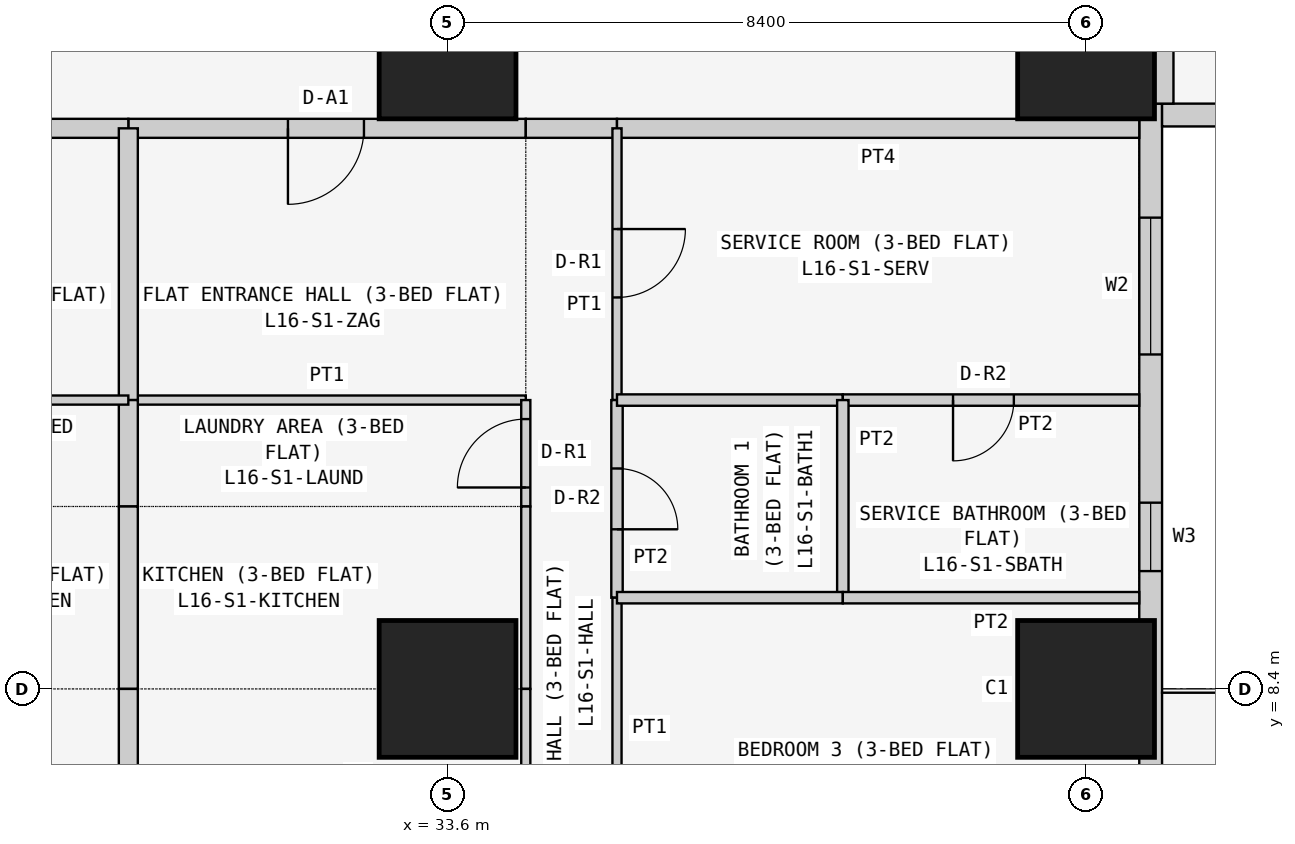
"""IFC4 building model, lengths in metres.
Left out: names, types, materials, properties, quantities, classifications, styles, units other than length and angle.
Written with IfcOpenShell. Run it as: python <this file> out.ifc"""

import sys

from ifc_helpers import new_model, si_unit, direction, frame, frame_2d, origin, origin_2d, place, context, subcontext, project, spatial, rectangle, extrude, element, fill, save


model = new_model("IFC4")
c1 = context("Model", 3, precision=1e-05, world=origin(), true_north=direction((0.0, 1.0)))
c2 = subcontext(c1, "Body", "Model", "MODEL_VIEW")
j1 = project(units=[si_unit("LENGTHUNIT", "METRE"), si_unit("PLANEANGLEUNIT", "RADIAN")], contexts=[c1])
p1 = place(None, origin())
s1 = spatial("IfcSite", under=j1, at=p1, CompositionType="ELEMENT")
p2 = place(p1, origin())
s2 = spatial("IfcBuilding", under=s1, at=p2, CompositionType="ELEMENT")
p3 = place(p2, frame((0.0, 0.0, 66.9)))
s3 = spatial("IfcBuildingStorey", under=s2, at=p3, CompositionType="ELEMENT", Elevation=66.9)
for number, where, z_axis, x_axis in (
    (1, (33.6, 8.4, 0.0), (0.0, 0.0, 1.0), (1.0, 0.0, 0.0)),
    (2, (33.6, 16.8, 0.0), (0.0, 0.0, 1.0), (1.0, 0.0, 0.0)),
    (3, (42.0, 8.4, 0.0), (0.0, 0.0, 1.0), (1.0, 0.0, 0.0)),
    (4, (42.0, 16.8, 0.0), (0.0, 0.0, 1.0), (1.0, 0.0, 0.0)),
):
    element("IfcColumn", number, at=place(p3, frame(where, z_axis=z_axis, x_axis=x_axis)), inside=s3, PredefinedType="COLUMN", context=c2, shape_type="SweptSolid", body=[
        extrude(rectangle(XDim=1.8, YDim=1.8, at=origin_2d()), origin(), (0.0, 0.0, 1.0), 3.6),
    ])
p4 = place(p3, frame((42.85, 0.4, 0.0), z_axis=(0.0, 0.0, 1.0), x_axis=(0.0, 1.0, 0.0)))
e5 = element("IfcWall", 5, at=p4, inside=s3, PredefinedType="SOLIDWALL", context=c2, shape_type="SweptSolid", body=[
    extrude(rectangle(XDim=15.7, YDim=0.3, at=frame_2d((7.85, 0.0))), origin(), (0.0, 0.0, 1.0), 3.45),
])
p5 = place(p4, frame((12.4, 0.0, 0.9)))
e6 = element("IfcOpeningElement", 6, at=p5, cuts=e5, PredefinedType="OPENING", context=c2, shape_type="SweptSolid", body=[
    extrude(rectangle(XDim=1.8, YDim=1.5, at=frame_2d((0.9, 0.75))), frame((0.0, 0.16, 0.0), z_axis=(0.0, -1.0, 0.0), x_axis=(1.0, 0.0, 0.0)), (0.0, 0.0, 1.0), 0.32),
])
p6 = place(p4, frame((9.55, 0.0, 1.5)))
e7 = element("IfcOpeningElement", 7, at=p6, cuts=e5, PredefinedType="OPENING", context=c2, shape_type="SweptSolid", body=[
    extrude(rectangle(XDim=0.9, YDim=0.7, at=frame_2d((0.45, 0.35))), frame((0.0, 0.16, 0.0), z_axis=(0.0, -1.0, 0.0), x_axis=(1.0, 0.0, 0.0)), (0.0, 0.0, 1.0), 0.32),
])
p7 = place(p4, frame((5.1, 0.0, 0.9)))
e8 = element("IfcOpeningElement", 8, at=p7, cuts=e5, PredefinedType="OPENING", context=c2, shape_type="SweptSolid", body=[
    extrude(rectangle(XDim=1.8, YDim=1.5, at=frame_2d((0.9, 0.75))), frame((0.0, 0.16, 0.0), z_axis=(0.0, -1.0, 0.0), x_axis=(1.0, 0.0, 0.0)), (0.0, 0.0, 1.0), 0.32),
])
p8 = place(p4, frame((2.0, 0.0, 0.0)))
e9 = element("IfcOpeningElement", 9, at=p8, cuts=e5, PredefinedType="OPENING", context=c2, shape_type="SweptSolid", body=[
    extrude(rectangle(XDim=0.9, YDim=2.4, at=frame_2d((0.45, 1.2))), frame((0.0, 0.16, 0.0), z_axis=(0.0, -1.0, 0.0), x_axis=(1.0, 0.0, 0.0)), (0.0, 0.0, 1.0), 0.32),
])
p9 = place(p4, frame((0.7, 0.0, 0.9)))
e10 = element("IfcOpeningElement", 10, at=p9, cuts=e5, PredefinedType="OPENING", context=c2, shape_type="SweptSolid", body=[
    extrude(rectangle(XDim=1.2, YDim=1.5, at=frame_2d((0.6, 0.75))), frame((0.0, 0.16, 0.0), z_axis=(0.0, -1.0, 0.0), x_axis=(1.0, 0.0, 0.0)), (0.0, 0.0, 1.0), 0.32),
])
p10 = place(p3, frame((43.0, 15.95, 0.0), z_axis=(0.0, 0.0, 1.0), x_axis=(1.0, 0.0, 0.0)))
e11 = element("IfcWall", 11, at=p10, inside=s3, PredefinedType="SOLIDWALL", context=c2, shape_type="SweptSolid", body=[
    extrude(rectangle(XDim=15.4, YDim=0.3, at=frame_2d((7.7, 0.0))), origin(), (0.0, 0.0, 1.0), 3.45),
])
p11 = place(p10, frame((1.2, 0.0, 0.9)))
e12 = element("IfcOpeningElement", 12, at=p11, cuts=e11, PredefinedType="OPENING", context=c2, shape_type="SweptSolid", body=[
    extrude(rectangle(XDim=1.8, YDim=1.5, at=frame_2d((0.9, 0.75))), frame((0.0, 0.16, 0.0), z_axis=(0.0, -1.0, 0.0), x_axis=(1.0, 0.0, 0.0)), (0.0, 0.0, 1.0), 0.32),
])
p12 = place(p10, frame((4.95, 0.0, 1.5)))
e13 = element("IfcOpeningElement", 13, at=p12, cuts=e11, PredefinedType="OPENING", context=c2, shape_type="SweptSolid", body=[
    extrude(rectangle(XDim=0.9, YDim=0.7, at=frame_2d((0.45, 0.35))), frame((0.0, 0.16, 0.0), z_axis=(0.0, -1.0, 0.0), x_axis=(1.0, 0.0, 0.0)), (0.0, 0.0, 1.0), 0.32),
])
p13 = place(p10, frame((8.5, 0.0, 0.9)))
e14 = element("IfcOpeningElement", 14, at=p13, cuts=e11, PredefinedType="OPENING", context=c2, shape_type="SweptSolid", body=[
    extrude(rectangle(XDim=1.8, YDim=1.5, at=frame_2d((0.9, 0.75))), frame((0.0, 0.16, 0.0), z_axis=(0.0, -1.0, 0.0), x_axis=(1.0, 0.0, 0.0)), (0.0, 0.0, 1.0), 0.32),
])
p14 = place(p10, frame((12.5, 0.0, 0.0)))
e15 = element("IfcOpeningElement", 15, at=p14, cuts=e11, PredefinedType="OPENING", context=c2, shape_type="SweptSolid", body=[
    extrude(rectangle(XDim=0.9, YDim=2.4, at=frame_2d((0.45, 1.2))), frame((0.0, 0.16, 0.0), z_axis=(0.0, -1.0, 0.0), x_axis=(1.0, 0.0, 0.0)), (0.0, 0.0, 1.0), 0.32),
])
p15 = place(p10, frame((13.5, 0.0, 0.9)))
e16 = element("IfcOpeningElement", 16, at=p15, cuts=e11, PredefinedType="OPENING", context=c2, shape_type="SweptSolid", body=[
    extrude(rectangle(XDim=1.2, YDim=1.5, at=frame_2d((0.6, 0.75))), frame((0.0, 0.16, 0.0), z_axis=(0.0, -1.0, 0.0), x_axis=(1.0, 0.0, 0.0)), (0.0, 0.0, 1.0), 0.32),
])
p16 = place(p3, frame((43.025, 22.971, 0.0), z_axis=(0.0, 0.0, 1.0), x_axis=(0.0, -1.0, 0.0)))
e17 = element("IfcWall", 17, at=p16, inside=s3, PredefinedType="PARTITIONING", context=c2, shape_type="SweptSolid", body=[
    extrude(rectangle(XDim=6.871, YDim=0.25, at=frame_2d((3.436, 0.0))), origin(), (0.0, 0.0, 1.0), 3.45),
])
p17 = place(p3, frame((34.629, 15.775, 0.0), z_axis=(0.0, 0.0, 1.0), x_axis=(-1.0, 0.0, 0.0)))
e18 = element("IfcWall", 18, at=p17, inside=s3, PredefinedType="PARTITIONING", context=c2, shape_type="SweptSolid", body=[
    extrude(rectangle(XDim=5.229, YDim=0.25, at=frame_2d((2.615, 0.0))), origin(), (0.0, 0.0, 1.0), 3.45),
])
p18 = place(p17, frame((2.129, 0.0, 0.0)))
e19 = element("IfcOpeningElement", 19, at=p18, cuts=e18, PredefinedType="OPENING", context=c2, shape_type="SweptSolid", body=[
    extrude(rectangle(XDim=1.0, YDim=2.1, at=frame_2d((0.5, 1.05))), frame((0.0, 0.135, 0.0), z_axis=(0.0, -1.0, 0.0), x_axis=(1.0, 0.0, 0.0)), (0.0, 0.0, 1.0), 0.27),
])
p19 = place(p3, frame((35.829, 15.775, 0.0), z_axis=(0.0, 0.0, 1.0), x_axis=(-1.0, 0.0, 0.0)))
e20 = element("IfcWall", 20, at=p19, inside=s3, PredefinedType="PARTITIONING", context=c2, shape_type="SweptSolid", body=[
    extrude(rectangle(XDim=1.2, YDim=0.25, at=frame_2d((0.6, 0.0))), origin(), (0.0, 0.0, 1.0), 3.45),
])
p20 = place(p3, frame((42.7, 15.775, 0.0), z_axis=(0.0, 0.0, 1.0), x_axis=(-1.0, 0.0, 0.0)))
e21 = element("IfcWall", 21, at=p20, inside=s3, PredefinedType="PARTITIONING", context=c2, shape_type="SweptSolid", body=[
    extrude(rectangle(XDim=6.871, YDim=0.25, at=frame_2d((3.436, 0.0))), origin(), (0.0, 0.0, 1.0), 3.45),
])
p21 = place(p3, frame((29.4, 15.775, 0.0), z_axis=(0.0, 0.0, 1.0), x_axis=(-1.0, 0.0, 0.0)))
e22 = element("IfcWall", 22, at=p21, inside=s3, PredefinedType="PARTITIONING", context=c2, shape_type="SweptSolid", body=[
    extrude(rectangle(XDim=5.229, YDim=0.25, at=frame_2d((2.615, 0.0))), origin(), (0.0, 0.0, 1.0), 3.45),
])
p22 = place(p21, frame((2.1, 0.0, 0.0)))
e23 = element("IfcOpeningElement", 23, at=p22, cuts=e22, PredefinedType="OPENING", context=c2, shape_type="SweptSolid", body=[
    extrude(rectangle(XDim=1.0, YDim=2.1, at=frame_2d((0.5, 1.05))), frame((0.0, 0.135, 0.0), z_axis=(0.0, -1.0, 0.0), x_axis=(1.0, 0.0, 0.0)), (0.0, 0.0, 1.0), 0.27),
])
p23 = place(p3, frame((29.4, 12.2, 0.0), z_axis=(0.0, 0.0, 1.0), x_axis=(1.0, 0.0, 0.0)))
e24 = element("IfcWall", 24, at=p23, inside=s3, PredefinedType="PARTITIONING", context=c2, shape_type="SweptSolid", body=[
    extrude(rectangle(XDim=5.229, YDim=0.12, at=frame_2d((2.615, 0.0))), origin(), (0.0, 0.0, 1.0), 3.45),
])
p24 = place(p3, frame((29.4, 15.775, 0.0), z_axis=(0.0, 0.0, 1.0), x_axis=(0.0, -1.0, 0.0)))
e25 = element("IfcWall", 25, at=p24, inside=s3, PredefinedType="PARTITIONING", context=c2, shape_type="SweptSolid", body=[
    extrude(rectangle(XDim=3.575, YDim=0.25, at=frame_2d((1.788, 0.0))), origin(), (0.0, 0.0, 1.0), 2.848),
])
p25 = place(p3, frame((34.629, 10.8, 0.0), z_axis=(0.0, 0.0, 1.0), x_axis=(0.0, 1.0, 0.0)))
e26 = element("IfcWall", 26, at=p25, inside=s3, PredefinedType="PARTITIONING", context=c2, shape_type="SweptSolid", body=[
    extrude(rectangle(XDim=1.4, YDim=0.12, at=frame_2d((0.7, 0.0))), origin(), (0.0, 0.0, 1.0), 3.45),
])
p26 = place(p25, frame((0.25, 0.0, 0.0)))
e27 = element("IfcOpeningElement", 27, at=p26, cuts=e26, PredefinedType="OPENING", context=c2, shape_type="SweptSolid", body=[
    extrude(rectangle(XDim=0.9, YDim=2.1, at=frame_2d((0.45, 1.05))), frame((0.0, 0.07, 0.0), z_axis=(0.0, -1.0, 0.0), x_axis=(1.0, 0.0, 0.0)), (0.0, 0.0, 1.0), 0.14),
])
p27 = place(p3, frame((29.4, 12.2, 0.0), z_axis=(0.0, 0.0, 1.0), x_axis=(0.0, -1.0, 0.0)))
e28 = element("IfcWall", 28, at=p27, inside=s3, PredefinedType="PARTITIONING", context=c2, shape_type="SweptSolid", body=[
    extrude(rectangle(XDim=1.4, YDim=0.25, at=frame_2d((0.7, 0.0))), origin(), (0.0, 0.0, 1.0), 2.848),
])
p28 = place(p3, frame((34.629, 8.4, 0.0), z_axis=(0.0, 0.0, 1.0), x_axis=(0.0, 1.0, 0.0)))
e29 = element("IfcWall", 29, at=p28, inside=s3, PredefinedType="PARTITIONING", context=c2, shape_type="SweptSolid", body=[
    extrude(rectangle(XDim=2.4, YDim=0.12, at=frame_2d((1.2, 0.0))), origin(), (0.0, 0.0, 1.0), 3.45),
])
p29 = place(p3, frame((29.4, 10.8, 0.0), z_axis=(0.0, 0.0, 1.0), x_axis=(0.0, -1.0, 0.0)))
e30 = element("IfcWall", 30, at=p29, inside=s3, PredefinedType="PARTITIONING", context=c2, shape_type="SweptSolid", body=[
    extrude(rectangle(XDim=2.4, YDim=0.25, at=frame_2d((1.2, 0.0))), origin(), (0.0, 0.0, 1.0), 2.848),
])
p30 = place(p3, frame((34.629, 3.5, 0.0), z_axis=(0.0, 0.0, 1.0), x_axis=(0.0, 1.0, 0.0)))
e31 = element("IfcWall", 31, at=p30, inside=s3, PredefinedType="PARTITIONING", context=c2, shape_type="SweptSolid", body=[
    extrude(rectangle(XDim=4.9, YDim=0.12, at=frame_2d((2.45, 0.0))), origin(), (0.0, 0.0, 1.0), 3.45),
])
p31 = place(p30, frame((1.25, 0.0, 0.0)))
e32 = element("IfcOpeningElement", 32, at=p31, cuts=e31, PredefinedType="OPENING", context=c2, shape_type="SweptSolid", body=[
    extrude(rectangle(XDim=0.9, YDim=2.1, at=frame_2d((0.45, 1.05))), frame((0.0, 0.07, 0.0), z_axis=(0.0, -1.0, 0.0), x_axis=(1.0, 0.0, 0.0)), (0.0, 0.0, 1.0), 0.14),
])
p32 = place(p3, frame((29.4, 8.4, 0.0), z_axis=(0.0, 0.0, 1.0), x_axis=(0.0, -1.0, 0.0)))
e33 = element("IfcWall", 33, at=p32, inside=s3, PredefinedType="PARTITIONING", context=c2, shape_type="SweptSolid", body=[
    extrude(rectangle(XDim=9.05, YDim=0.25, at=frame_2d((4.525, 0.0))), origin(), (0.0, 0.0, 1.0), 2.848),
])
p33 = place(p3, frame((35.829, 12.2, 0.0), z_axis=(0.0, 0.0, 1.0), x_axis=(0.0, 1.0, 0.0)))
e34 = element("IfcWall", 34, at=p33, inside=s3, PredefinedType="PARTITIONING", context=c2, shape_type="SweptSolid", body=[
    extrude(rectangle(XDim=3.575, YDim=0.12, at=frame_2d((1.788, 0.0))), origin(), (0.0, 0.0, 1.0), 3.45),
])
p34 = place(p33, frame((1.35, 0.0, 0.0)))
e35 = element("IfcOpeningElement", 35, at=p34, cuts=e34, PredefinedType="OPENING", context=c2, shape_type="SweptSolid", body=[
    extrude(rectangle(XDim=0.9, YDim=2.1, at=frame_2d((0.45, 1.05))), frame((0.0, 0.07, 0.0), z_axis=(0.0, -1.0, 0.0), x_axis=(1.0, 0.0, 0.0)), (0.0, 0.0, 1.0), 0.14),
])
p35 = place(p3, frame((35.829, 9.6, 0.0), z_axis=(0.0, 0.0, 1.0), x_axis=(0.0, 1.0, 0.0)))
e36 = element("IfcWall", 36, at=p35, inside=s3, PredefinedType="PARTITIONING", context=c2, shape_type="SweptSolid", body=[
    extrude(rectangle(XDim=2.6, YDim=0.15, at=frame_2d((1.3, 0.0))), origin(), (0.0, 0.0, 1.0), 3.45),
])
p36 = place(p35, frame((0.9, 0.0, 0.0)))
e37 = element("IfcOpeningElement", 37, at=p36, cuts=e36, PredefinedType="OPENING", context=c2, shape_type="SweptSolid", body=[
    extrude(rectangle(XDim=0.8, YDim=2.1, at=frame_2d((0.4, 1.05))), frame((0.0, 0.085, 0.0), z_axis=(0.0, -1.0, 0.0), x_axis=(1.0, 0.0, 0.0)), (0.0, 0.0, 1.0), 0.17),
])
p37 = place(p3, frame((35.829, 4.7, 0.0), z_axis=(0.0, 0.0, 1.0), x_axis=(0.0, 1.0, 0.0)))
e38 = element("IfcWall", 38, at=p37, inside=s3, PredefinedType="PARTITIONING", context=c2, shape_type="SweptSolid", body=[
    extrude(rectangle(XDim=4.9, YDim=0.12, at=frame_2d((2.45, 0.0))), origin(), (0.0, 0.0, 1.0), 3.45),
])
p38 = place(p37, frame((1.65, 0.0, 0.0)))
e39 = element("IfcOpeningElement", 39, at=p38, cuts=e38, PredefinedType="OPENING", context=c2, shape_type="SweptSolid", body=[
    extrude(rectangle(XDim=0.9, YDim=2.1, at=frame_2d((0.45, 1.05))), frame((0.0, 0.07, 0.0), z_axis=(0.0, -1.0, 0.0), x_axis=(1.0, 0.0, 0.0)), (0.0, 0.0, 1.0), 0.14),
])
p39 = place(p3, frame((35.829, 12.2, 0.0), z_axis=(0.0, 0.0, 1.0), x_axis=(1.0, 0.0, 0.0)))
e40 = element("IfcWall", 40, at=p39, inside=s3, PredefinedType="PARTITIONING", context=c2, shape_type="SweptSolid", body=[
    extrude(rectangle(XDim=2.971, YDim=0.15, at=frame_2d((1.485, 0.0))), origin(), (0.0, 0.0, 1.0), 3.45),
])
p40 = place(p3, frame((38.8, 12.2, 0.0), z_axis=(0.0, 0.0, 1.0), x_axis=(1.0, 0.0, 0.0)))
e41 = element("IfcWall", 41, at=p40, inside=s3, PredefinedType="PARTITIONING", context=c2, shape_type="SweptSolid", body=[
    extrude(rectangle(XDim=3.9, YDim=0.15, at=frame_2d((1.95, 0.0))), origin(), (0.0, 0.0, 1.0), 3.45),
])
p41 = place(p40, frame((1.45, 0.0, 0.0)))
e42 = element("IfcOpeningElement", 42, at=p41, cuts=e41, PredefinedType="OPENING", context=c2, shape_type="SweptSolid", body=[
    extrude(rectangle(XDim=0.8, YDim=2.1, at=frame_2d((0.4, 1.05))), frame((0.0, 0.085, 0.0), z_axis=(0.0, -1.0, 0.0), x_axis=(1.0, 0.0, 0.0)), (0.0, 0.0, 1.0), 0.17),
])
p42 = place(p3, frame((38.8, 9.6, 0.0), z_axis=(0.0, 0.0, 1.0), x_axis=(0.0, 1.0, 0.0)))
e43 = element("IfcWall", 43, at=p42, inside=s3, PredefinedType="PARTITIONING", context=c2, shape_type="SweptSolid", body=[
    extrude(rectangle(XDim=2.6, YDim=0.15, at=frame_2d((1.3, 0.0))), origin(), (0.0, 0.0, 1.0), 3.45),
])
p43 = place(p3, frame((35.829, 9.6, 0.0), z_axis=(0.0, 0.0, 1.0), x_axis=(1.0, 0.0, 0.0)))
e44 = element("IfcWall", 44, at=p43, inside=s3, PredefinedType="PARTITIONING", context=c2, shape_type="SweptSolid", body=[
    extrude(rectangle(XDim=2.971, YDim=0.15, at=frame_2d((1.485, 0.0))), origin(), (0.0, 0.0, 1.0), 3.45),
])
p44 = place(p3, frame((38.8, 9.6, 0.0), z_axis=(0.0, 0.0, 1.0), x_axis=(1.0, 0.0, 0.0)))
e45 = element("IfcWall", 45, at=p44, inside=s3, PredefinedType="PARTITIONING", context=c2, shape_type="SweptSolid", body=[
    extrude(rectangle(XDim=3.9, YDim=0.15, at=frame_2d((1.95, 0.0))), origin(), (0.0, 0.0, 1.0), 3.45),
])
p45 = place(p3, frame((29.4, 12.2, 0.0), z_axis=(0.0, 0.0, 1.0), x_axis=(-1.0, 0.0, 0.0)))
e46 = element("IfcWall", 46, at=p45, inside=s3, PredefinedType="PARTITIONING", context=c2, shape_type="SweptSolid", body=[
    extrude(rectangle(XDim=5.229, YDim=0.12, at=frame_2d((2.615, 0.0))), origin(), (0.0, 0.0, 1.0), 3.45),
])
p46 = place(p5, origin())
e47 = element("IfcWindow", 47, at=p46, inside=s3, PartitioningType="SINGLE_PANEL", PredefinedType="WINDOW", context=c2, shape_type="SweptSolid", body=[
    extrude(rectangle(XDim=1.8, YDim=1.5, at=frame_2d((0.9, 0.75))), frame((0.0, 0.03, 0.0), z_axis=(0.0, -1.0, 0.0), x_axis=(1.0, 0.0, 0.0)), (0.0, 0.0, 1.0), 0.06),
])
fill(e6, e47)
p47 = place(p6, origin())
e48 = element("IfcWindow", 48, at=p47, inside=s3, PartitioningType="SINGLE_PANEL", PredefinedType="WINDOW", context=c2, shape_type="SweptSolid", body=[
    extrude(rectangle(XDim=0.9, YDim=0.7, at=frame_2d((0.45, 0.35))), frame((0.0, 0.03, 0.0), z_axis=(0.0, -1.0, 0.0), x_axis=(1.0, 0.0, 0.0)), (0.0, 0.0, 1.0), 0.06),
])
fill(e7, e48)
p48 = place(p18, origin())
e49 = element("IfcDoor", 49, at=p48, inside=s3, OperationType="SINGLE_SWING_RIGHT", PredefinedType="DOOR", context=c2, shape_type="SweptSolid", body=[
    extrude(rectangle(XDim=1.0, YDim=2.1, at=frame_2d((0.5, 1.05))), frame((0.0, 0.025, 0.0), z_axis=(0.0, -1.0, 0.0), x_axis=(1.0, 0.0, 0.0)), (0.0, 0.0, 1.0), 0.05),
])
fill(e19, e49)
p49 = place(p26, origin())
e50 = element("IfcDoor", 50, at=p49, inside=s3, OperationType="SINGLE_SWING_LEFT", PredefinedType="DOOR", context=c2, shape_type="SweptSolid", body=[
    extrude(rectangle(XDim=0.9, YDim=2.1, at=frame_2d((0.45, 1.05))), frame((0.0, 0.025, 0.0), z_axis=(0.0, -1.0, 0.0), x_axis=(1.0, 0.0, 0.0)), (0.0, 0.0, 1.0), 0.05),
])
fill(e27, e50)
p50 = place(p34, frame((0.9, 0.0, 0.0), z_axis=(0.0, 0.0, 1.0), x_axis=(-1.0, 0.0, 0.0)))
e51 = element("IfcDoor", 51, at=p50, inside=s3, OperationType="SINGLE_SWING_LEFT", PredefinedType="DOOR", context=c2, shape_type="SweptSolid", body=[
    extrude(rectangle(XDim=0.9, YDim=2.1, at=frame_2d((0.45, 1.05))), frame((0.0, 0.025, 0.0), z_axis=(0.0, -1.0, 0.0), x_axis=(1.0, 0.0, 0.0)), (0.0, 0.0, 1.0), 0.05),
])
fill(e35, e51)
p51 = place(p41, frame((0.8, 0.0, 0.0), z_axis=(0.0, 0.0, 1.0), x_axis=(-1.0, 0.0, 0.0)))
e52 = element("IfcDoor", 52, at=p51, inside=s3, OperationType="SINGLE_SWING_RIGHT", PredefinedType="DOOR", context=c2, shape_type="SweptSolid", body=[
    extrude(rectangle(XDim=0.8, YDim=2.1, at=frame_2d((0.4, 1.05))), frame((0.0, 0.025, 0.0), z_axis=(0.0, -1.0, 0.0), x_axis=(1.0, 0.0, 0.0)), (0.0, 0.0, 1.0), 0.05),
])
fill(e42, e52)
p52 = place(p36, frame((0.8, 0.0, 0.0), z_axis=(0.0, 0.0, 1.0), x_axis=(-1.0, 0.0, 0.0)))
e53 = element("IfcDoor", 53, at=p52, inside=s3, OperationType="SINGLE_SWING_RIGHT", PredefinedType="DOOR", context=c2, shape_type="SweptSolid", body=[
    extrude(rectangle(XDim=0.8, YDim=2.1, at=frame_2d((0.4, 1.05))), frame((0.0, 0.025, 0.0), z_axis=(0.0, -1.0, 0.0), x_axis=(1.0, 0.0, 0.0)), (0.0, 0.0, 1.0), 0.05),
])
fill(e37, e53)
save(model, sys.argv[1])
